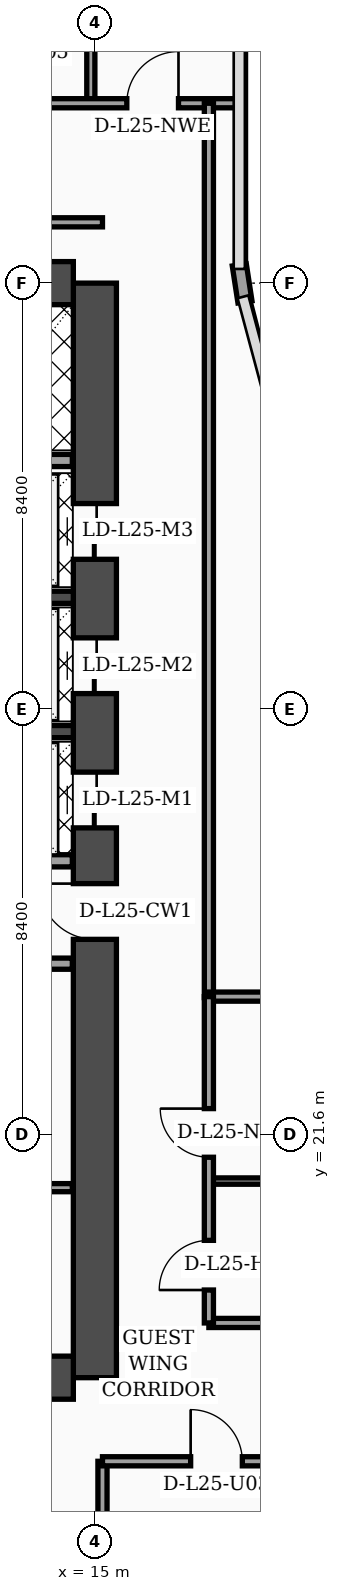
"""IFC4 building model, lengths in metres.
Left out: names, types, materials, properties, quantities, classifications, styles, units other than length and angle.
Written with IfcOpenShell. Run it as: python <this file> out.ifc"""

import sys

from ifc_helpers import new_model, si_unit, direction, frame, frame_2d, origin, place, context, subcontext, project, spatial, rectangle, extrude, element, fill, save


model = new_model("IFC4")
c1 = context("Model", 3, precision=1e-05, world=origin(), true_north=direction((0.0, 1.0)))
c2 = subcontext(c1, "Body", "Model", "MODEL_VIEW")
j1 = project(units=[si_unit("LENGTHUNIT", "METRE"), si_unit("PLANEANGLEUNIT", "RADIAN")], contexts=[c1])
p1 = place(None, origin())
s1 = spatial("IfcSite", under=j1, at=p1, CompositionType="ELEMENT")
p2 = place(p1, origin())
s2 = spatial("IfcBuilding", under=s1, at=p2, CompositionType="ELEMENT")
p3 = place(p2, frame((0.0, 0.0, 105.0)))
s3 = spatial("IfcBuildingStorey", under=s2, at=p3, CompositionType="ELEMENT", Elevation=105.0)
p4 = place(p3, frame((15.0, 16.8, 0.0), z_axis=(0.0, 0.0, 1.0), x_axis=(0.0, 1.0, 0.0)))
e1 = element("IfcWall", 1, at=p4, inside=s3, PredefinedType="SHEAR", context=c2, shape_type="SweptSolid", body=[
    extrude(rectangle(XDim=21.6, YDim=0.85, at=frame_2d((10.8, 0.0))), origin(), (0.0, 0.0, 1.0), 3.56),
])
p5 = place(p4, frame((8.65, 0.0, 0.0)))
e2 = element("IfcOpeningElement", 2, at=p5, cuts=e1, PredefinedType="OPENING", context=c2, shape_type="SweptSolid", body=[
    extrude(rectangle(XDim=1.1, YDim=2.2, at=frame_2d((0.55, 1.1))), frame((0.0, 0.435, 0.0), z_axis=(0.0, -1.0, 0.0), x_axis=(1.0, 0.0, 0.0)), (0.0, 0.0, 1.0), 0.87),
])
p6 = place(p4, frame((10.85, 0.0, 0.0)))
e3 = element("IfcOpeningElement", 3, at=p6, cuts=e1, PredefinedType="OPENING", context=c2, shape_type="SweptSolid", body=[
    extrude(rectangle(XDim=1.1, YDim=2.2, at=frame_2d((0.55, 1.1))), frame((0.0, 0.435, 0.0), z_axis=(0.0, -1.0, 0.0), x_axis=(1.0, 0.0, 0.0)), (0.0, 0.0, 1.0), 0.87),
])
p7 = place(p4, frame((13.5, 0.0, 0.0)))
e4 = element("IfcOpeningElement", 4, at=p7, cuts=e1, PredefinedType="OPENING", context=c2, shape_type="SweptSolid", body=[
    extrude(rectangle(XDim=1.1, YDim=2.2, at=frame_2d((0.55, 1.1))), frame((0.0, 0.435, 0.0), z_axis=(0.0, -1.0, 0.0), x_axis=(1.0, 0.0, 0.0)), (0.0, 0.0, 1.0), 0.87),
])
p8 = place(p4, frame((16.15, 0.0, 0.0)))
e5 = element("IfcOpeningElement", 5, at=p8, cuts=e1, PredefinedType="OPENING", context=c2, shape_type="SweptSolid", body=[
    extrude(rectangle(XDim=1.1, YDim=2.2, at=frame_2d((0.55, 1.1))), frame((0.0, 0.435, 0.0), z_axis=(0.0, -1.0, 0.0), x_axis=(1.0, 0.0, 0.0)), (0.0, 0.0, 1.0), 0.87),
])
for number, where, z_axis, x_axis in (
    (6, (4.625, 38.4, 0.0), (0.0, 0.0, 1.0), (1.0, 0.0, 0.0)),
    (7, (4.625, 16.8, 0.0), (0.0, 0.0, 1.0), (1.0, 0.0, 0.0)),
):
    element("IfcWall", number, at=place(p3, frame(where, z_axis=z_axis, x_axis=x_axis)), inside=s3, PredefinedType="SHEAR", context=c2, shape_type="SweptSolid", body=[
        extrude(rectangle(XDim=9.95, YDim=0.85, at=frame_2d((4.975, 0.0))), origin(), (0.0, 0.0, 1.0), 3.56),
    ])
for number, where, z_axis, x_axis in (
    (8, (12.18, 29.55, 0.0), (0.0, 0.0, 1.0), (1.0, 0.0, 0.0)),
    (9, (12.18, 32.2, 0.0), (0.0, 0.0, 1.0), (1.0, 0.0, 0.0)),
):
    element("IfcWall", number, at=place(p3, frame(where, z_axis=z_axis, x_axis=x_axis)), inside=s3, PredefinedType="SOLIDWALL", context=c2, shape_type="SweptSolid", body=[
        extrude(rectangle(XDim=2.395, YDim=0.24, at=frame_2d((1.198, 0.0))), origin(), (0.0, 0.0, 1.0), 3.56),
    ])
p9 = place(p3, frame((17.962, 38.03, 0.0), z_axis=(0.0, 0.0, 1.0), x_axis=(-0.15141125477, 0.988470855377, 0.0)))
e10 = element("IfcWall", 10, at=p9, inside=s3, PredefinedType="SOLIDWALL", context=c2, shape_type="SweptSolid", body=[
    extrude(rectangle(XDim=0.739, YDim=0.28, at=frame_2d((0.369, 0.0))), origin(), (0.0, 0.0, 1.0), 3.56),
])
p10 = place(p3, frame((9.68, 20.55, 0.0), z_axis=(0.0, 0.0, 1.0), x_axis=(1.0, 0.0, 0.0)))
e11 = element("IfcWall", 11, at=p10, inside=s3, PredefinedType="PARTITIONING", context=c2, shape_type="SweptSolid", body=[
    extrude(rectangle(XDim=4.875, YDim=0.16, at=frame_2d((2.438, 0.0))), origin(), (0.0, 0.0, 1.0), 3.56),
])
p11 = place(p10, frame((1.1, 0.0, 0.0)))
e12 = element("IfcOpeningElement", 12, at=p11, cuts=e11, PredefinedType="OPENING", context=c2, shape_type="SweptSolid", body=[
    extrude(rectangle(XDim=0.98, YDim=2.15, at=frame_2d((0.49, 1.075))), frame((0.0, 0.09, 0.0), z_axis=(0.0, -1.0, 0.0), x_axis=(1.0, 0.0, 0.0)), (0.0, 0.0, 1.0), 0.18),
])
p12 = place(p3, frame((9.68, 24.97, 0.0), z_axis=(0.0, 0.0, 1.0), x_axis=(1.0, 0.0, 0.0)))
e13 = element("IfcWall", 13, at=p12, inside=s3, PredefinedType="SOLIDWALL", context=c2, shape_type="SweptSolid", body=[
    extrude(rectangle(XDim=4.875, YDim=0.22, at=frame_2d((2.438, 0.0))), origin(), (0.0, 0.0, 1.0), 2.84),
])
p13 = place(p12, frame((0.9, 0.0, 0.0)))
e14 = element("IfcOpeningElement", 14, at=p13, cuts=e13, PredefinedType="OPENING", context=c2, shape_type="SweptSolid", body=[
    extrude(rectangle(XDim=0.98, YDim=2.15, at=frame_2d((0.49, 1.075))), frame((0.0, 0.12, 0.0), z_axis=(0.0, -1.0, 0.0), x_axis=(1.0, 0.0, 0.0)), (0.0, 0.0, 1.0), 0.24),
])
p14 = place(p3, frame((12.25, 27.0, 0.0), z_axis=(0.0, 0.0, 1.0), x_axis=(1.0, 0.0, 0.0)))
e15 = element("IfcWall", 15, at=p14, inside=s3, PredefinedType="SOLIDWALL", context=c2, shape_type="SweptSolid", body=[
    extrude(rectangle(XDim=2.305, YDim=0.24, at=frame_2d((1.152, 0.0))), origin(), (0.0, 0.0, 1.0), 3.56),
])
p15 = place(p3, frame((9.66, 34.9, 0.0), z_axis=(0.0, 0.0, 1.0), x_axis=(1.0, 0.0, 0.0)))
e16 = element("IfcWall", 16, at=p15, inside=s3, PredefinedType="SOLIDWALL", context=c2, shape_type="SweptSolid", body=[
    extrude(rectangle(XDim=4.895, YDim=0.24, at=frame_2d((2.448, 0.0))), origin(), (0.0, 0.0, 1.0), 3.56),
])
p16 = place(p3, frame((15.15, 2.44, 0.0), z_axis=(0.0, 0.0, 1.0), x_axis=(0.0, 1.0, 0.0)))
e17 = element("IfcWall", 17, at=p16, inside=s3, PredefinedType="PARTITIONING", context=c2, shape_type="SweptSolid", body=[
    extrude(rectangle(XDim=12.71, YDim=0.18, at=frame_2d((6.355, 0.0))), origin(), (0.0, 0.0, 1.0), 3.04),
])
p17 = place(p3, frame((15.15, 15.15, 0.0), z_axis=(0.0, 0.0, 1.0), x_axis=(1.0, 0.0, 0.0)))
e18 = element("IfcWall", 18, at=p17, inside=s3, PredefinedType="PARTITIONING", context=c2, shape_type="SweptSolid", body=[
    extrude(rectangle(XDim=6.45, YDim=0.18, at=frame_2d((3.225, 0.0))), origin(), (0.0, 0.0, 1.0), 2.49),
])
p18 = place(p17, frame((1.74, 0.0, 0.0)))
e19 = element("IfcOpeningElement", 19, at=p18, cuts=e18, PredefinedType="OPENING", context=c2, shape_type="SweptSolid", body=[
    extrude(rectangle(XDim=1.02, YDim=2.2, at=frame_2d((0.51, 1.1))), frame((0.0, 0.1, 0.0), z_axis=(0.0, -1.0, 0.0), x_axis=(1.0, 0.0, 0.0)), (0.0, 0.0, 1.0), 0.2),
])
p19 = place(p3, frame((14.92, 41.95, 0.0), z_axis=(0.0, 0.0, 1.0), x_axis=(0.0, 1.0, 0.0)))
e20 = element("IfcWall", 20, at=p19, inside=s3, PredefinedType="PARTITIONING", context=c2, shape_type="SweptSolid", body=[
    extrude(rectangle(XDim=5.85, YDim=0.16, at=frame_2d((2.925, 0.0))), origin(), (0.0, 0.0, 1.0), 3.04),
])
p20 = place(p3, frame((0.08, 41.95, 0.0), z_axis=(0.0, 0.0, 1.0), x_axis=(1.0, 0.0, 0.0)))
e21 = element("IfcWall", 21, at=p20, inside=s3, PredefinedType="PARTITIONING", context=c2, shape_type="SweptSolid", body=[
    extrude(rectangle(XDim=17.77, YDim=0.18, at=frame_2d((8.885, 0.0))), origin(), (0.0, 0.0, 1.0), 2.84),
])
p21 = place(p20, frame((0.9, 0.0, 0.0)))
e22 = element("IfcOpeningElement", 22, at=p21, cuts=e21, PredefinedType="OPENING", context=c2, shape_type="SweptSolid", body=[
    extrude(rectangle(XDim=1.02, YDim=2.2, at=frame_2d((0.51, 1.1))), frame((0.0, 0.1, 0.0), z_axis=(0.0, -1.0, 0.0), x_axis=(1.0, 0.0, 0.0)), (0.0, 0.0, 1.0), 0.2),
])
p22 = place(p20, frame((4.9, 0.0, 0.0)))
e23 = element("IfcOpeningElement", 23, at=p22, cuts=e21, PredefinedType="OPENING", context=c2, shape_type="SweptSolid", body=[
    extrude(rectangle(XDim=1.02, YDim=2.2, at=frame_2d((0.51, 1.1))), frame((0.0, 0.1, 0.0), z_axis=(0.0, -1.0, 0.0), x_axis=(1.0, 0.0, 0.0)), (0.0, 0.0, 1.0), 0.2),
])
p23 = place(p20, frame((10.78, 0.0, 0.0)))
e24 = element("IfcOpeningElement", 24, at=p23, cuts=e21, PredefinedType="OPENING", context=c2, shape_type="SweptSolid", body=[
    extrude(rectangle(XDim=1.02, YDim=2.2, at=frame_2d((0.51, 1.1))), frame((0.0, 0.1, 0.0), z_axis=(0.0, -1.0, 0.0), x_axis=(1.0, 0.0, 0.0)), (0.0, 0.0, 1.0), 0.2),
])
p24 = place(p20, frame((15.55, 0.0, 0.0)))
e25 = element("IfcOpeningElement", 25, at=p24, cuts=e21, PredefinedType="OPENING", context=c2, shape_type="SweptSolid", body=[
    extrude(rectangle(XDim=1.02, YDim=2.2, at=frame_2d((0.51, 1.1))), frame((0.0, 0.1, 0.0), z_axis=(0.0, -1.0, 0.0), x_axis=(1.0, 0.0, 0.0)), (0.0, 0.0, 1.0), 0.2),
])
p25 = place(p3, frame((17.25, 24.3, 0.0), z_axis=(0.0, 0.0, 1.0), x_axis=(0.0, 1.0, 0.0)))
e26 = element("IfcWall", 26, at=p25, inside=s3, PredefinedType="PARTITIONING", context=c2, shape_type="SweptSolid", body=[
    extrude(rectangle(XDim=17.65, YDim=0.18, at=frame_2d((8.825, 0.0))), origin(), (0.0, 0.0, 1.0), 2.84),
])
p26 = place(p3, frame((3.755, 39.6, 0.0), z_axis=(0.0, 0.0, 1.0), x_axis=(1.0, 0.0, 0.0)))
e27 = element("IfcWall", 27, at=p26, inside=s3, PredefinedType="PARTITIONING", context=c2, shape_type="SweptSolid", body=[
    extrude(rectangle(XDim=11.395, YDim=0.18, at=frame_2d((5.698, 0.0))), origin(), (0.0, 0.0, 1.0), 2.84),
])
p27 = place(p3, frame((17.25, 17.88, 0.0), z_axis=(0.0, 0.0, 1.0), x_axis=(1.0, 0.0, 0.0)))
e28 = element("IfcWall", 28, at=p27, inside=s3, PredefinedType="PARTITIONING", context=c2, shape_type="SweptSolid", body=[
    extrude(rectangle(XDim=4.3, YDim=0.18, at=frame_2d((2.15, 0.0))), origin(), (0.0, 0.0, 1.0), 3.09),
])
p28 = place(p3, frame((17.25, 20.68, 0.0), z_axis=(0.0, 0.0, 1.0), x_axis=(1.0, 0.0, 0.0)))
e29 = element("IfcWall", 29, at=p28, inside=s3, PredefinedType="PARTITIONING", context=c2, shape_type="SweptSolid", body=[
    extrude(rectangle(XDim=4.3, YDim=0.125, at=frame_2d((2.15, 0.0))), origin(), (0.0, 0.0, 1.0), 3.56),
])
p29 = place(p3, frame((17.25, 24.32, 0.0), z_axis=(0.0, 0.0, 1.0), x_axis=(1.0, 0.0, 0.0)))
e30 = element("IfcWall", 30, at=p29, inside=s3, PredefinedType="PARTITIONING", context=c2, shape_type="SweptSolid", body=[
    extrude(rectangle(XDim=4.35, YDim=0.18, at=frame_2d((2.175, 0.0))), origin(), (0.0, 0.0, 1.0), 3.56),
])
p30 = place(p3, frame((17.25, 17.88, 0.0), z_axis=(0.0, 0.0, 1.0), x_axis=(0.0, 1.0, 0.0)))
e31 = element("IfcWall", 31, at=p30, inside=s3, PredefinedType="PARTITIONING", context=c2, shape_type="SweptSolid", body=[
    extrude(rectangle(XDim=6.44, YDim=0.18, at=frame_2d((3.22, 0.0))), origin(), (0.0, 0.0, 1.0), 3.09),
])
p31 = place(p30, frame((0.65, 0.0, 0.0)))
e32 = element("IfcOpeningElement", 32, at=p31, cuts=e31, PredefinedType="OPENING", context=c2, shape_type="SweptSolid", body=[
    extrude(rectangle(XDim=0.98, YDim=2.15, at=frame_2d((0.49, 1.075))), frame((0.0, 0.1, 0.0), z_axis=(0.0, -1.0, 0.0), x_axis=(1.0, 0.0, 0.0)), (0.0, 0.0, 1.0), 0.2),
])
p32 = place(p30, frame((3.27, 0.0, 0.0)))
e33 = element("IfcOpeningElement", 33, at=p32, cuts=e31, PredefinedType="OPENING", context=c2, shape_type="SweptSolid", body=[
    extrude(rectangle(XDim=0.96, YDim=2.2, at=frame_2d((0.48, 1.1))), frame((0.0, 0.1, 0.0), z_axis=(0.0, -1.0, 0.0), x_axis=(1.0, 0.0, 0.0)), (0.0, 0.0, 1.0), 0.2),
])
p33 = place(p18, origin())
e34 = element("IfcDoor", 34, at=p33, inside=s3, OperationType="SINGLE_SWING_LEFT", PredefinedType="DOOR", context=c2, shape_type="SweptSolid", body=[
    extrude(rectangle(XDim=1.02, YDim=2.2, at=frame_2d((0.51, 1.1))), frame((0.0, 0.025, 0.0), z_axis=(0.0, -1.0, 0.0), x_axis=(1.0, 0.0, 0.0)), (0.0, 0.0, 1.0), 0.05),
])
fill(e19, e34)
p34 = place(p24, origin())
e35 = element("IfcDoor", 35, at=p34, inside=s3, OperationType="SINGLE_SWING_RIGHT", PredefinedType="DOOR", context=c2, shape_type="SweptSolid", body=[
    extrude(rectangle(XDim=1.02, YDim=2.2, at=frame_2d((0.51, 1.1))), frame((0.0, 0.025, 0.0), z_axis=(0.0, -1.0, 0.0), x_axis=(1.0, 0.0, 0.0)), (0.0, 0.0, 1.0), 0.05),
])
fill(e25, e35)
p35 = place(p31, origin())
e36 = element("IfcDoor", 36, at=p35, inside=s3, OperationType="SINGLE_SWING_LEFT", PredefinedType="DOOR", context=c2, shape_type="SweptSolid", body=[
    extrude(rectangle(XDim=0.98, YDim=2.15, at=frame_2d((0.49, 1.075))), frame((0.0, 0.025, 0.0), z_axis=(0.0, -1.0, 0.0), x_axis=(1.0, 0.0, 0.0)), (0.0, 0.0, 1.0), 0.05),
])
fill(e32, e36)
p36 = place(p32, origin())
e37 = element("IfcDoor", 37, at=p36, inside=s3, OperationType="SINGLE_SWING_RIGHT", PredefinedType="DOOR", context=c2, shape_type="SweptSolid", body=[
    extrude(rectangle(XDim=0.96, YDim=2.2, at=frame_2d((0.48, 1.1))), frame((0.0, 0.025, 0.0), z_axis=(0.0, -1.0, 0.0), x_axis=(1.0, 0.0, 0.0)), (0.0, 0.0, 1.0), 0.05),
])
fill(e33, e37)
p37 = place(p5, origin())
e38 = element("IfcDoor", 38, at=p37, inside=s3, OperationType="SINGLE_SWING_RIGHT", PredefinedType="DOOR", context=c2, shape_type="SweptSolid", body=[
    extrude(rectangle(XDim=1.1, YDim=2.2, at=frame_2d((0.55, 1.1))), frame((0.0, 0.025, 0.0), z_axis=(0.0, -1.0, 0.0), x_axis=(1.0, 0.0, 0.0)), (0.0, 0.0, 1.0), 0.05),
])
fill(e2, e38)
p38 = place(p6, origin())
e39 = element("IfcDoor", 39, at=p38, inside=s3, OperationType="DOUBLE_DOOR_SLIDING", PredefinedType="DOOR", context=c2, shape_type="SweptSolid", body=[
    extrude(rectangle(XDim=1.1, YDim=2.2, at=frame_2d((0.55, 1.1))), frame((0.0, 0.025, 0.0), z_axis=(0.0, -1.0, 0.0), x_axis=(1.0, 0.0, 0.0)), (0.0, 0.0, 1.0), 0.05),
])
fill(e3, e39)
p39 = place(p7, origin())
e40 = element("IfcDoor", 40, at=p39, inside=s3, OperationType="DOUBLE_DOOR_SLIDING", PredefinedType="DOOR", context=c2, shape_type="SweptSolid", body=[
    extrude(rectangle(XDim=1.1, YDim=2.2, at=frame_2d((0.55, 1.1))), frame((0.0, 0.025, 0.0), z_axis=(0.0, -1.0, 0.0), x_axis=(1.0, 0.0, 0.0)), (0.0, 0.0, 1.0), 0.05),
])
fill(e4, e40)
p40 = place(p8, origin())
e41 = element("IfcDoor", 41, at=p40, inside=s3, OperationType="DOUBLE_DOOR_SLIDING", PredefinedType="DOOR", context=c2, shape_type="SweptSolid", body=[
    extrude(rectangle(XDim=1.1, YDim=2.2, at=frame_2d((0.55, 1.1))), frame((0.0, 0.025, 0.0), z_axis=(0.0, -1.0, 0.0), x_axis=(1.0, 0.0, 0.0)), (0.0, 0.0, 1.0), 0.05),
])
fill(e5, e41)
save(model, sys.argv[1])
